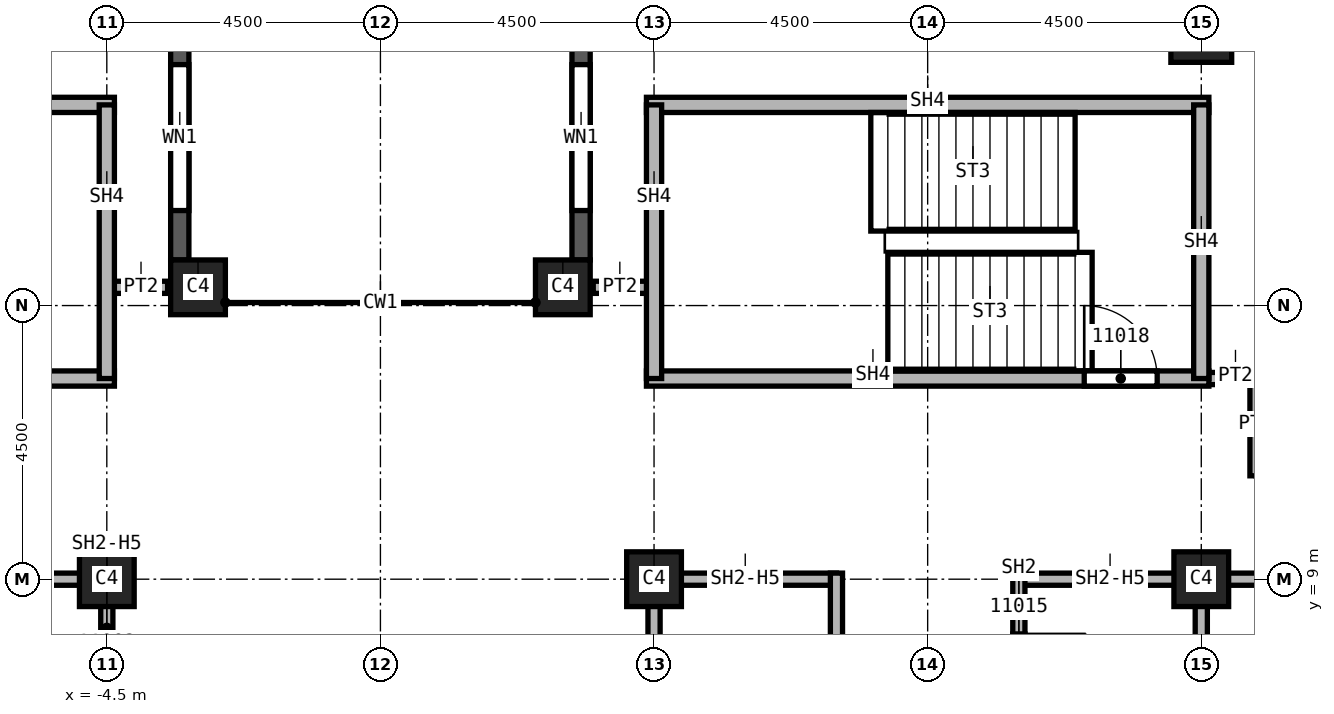
"""IFC4 building model, lengths in metres.
Left out: names, types, materials, properties, quantities, classifications, styles, units other than length and angle.
Written with IfcOpenShell. Run it as: python <this file> out.ifc"""

import sys

from ifc_helpers import new_model, si_unit, direction, frame, frame_2d, origin, origin_2d, place, context, subcontext, project, spatial, rectangle, extrude, element, fill, save


model = new_model("IFC4")
c1 = context("Model", 3, precision=1e-05, world=origin(), true_north=direction((0.0, 1.0)))
c2 = subcontext(c1, "Body", "Model", "MODEL_VIEW")
j1 = project(units=[si_unit("LENGTHUNIT", "METRE"), si_unit("PLANEANGLEUNIT", "RADIAN")], contexts=[c1])
p1 = place(None, origin())
s1 = spatial("IfcSite", under=j1, at=p1, CompositionType="ELEMENT")
p2 = place(p1, origin())
s2 = spatial("IfcBuilding", under=s1, at=p2, CompositionType="ELEMENT")
p3 = place(p2, frame((0.0, 0.0, 188.0)))
s3 = spatial("IfcBuildingStorey", under=s2, at=p3, CompositionType="ELEMENT", Elevation=188.0)
p4 = place(p3, frame((13.5, 18.0, 0.0), z_axis=(0.0, 0.0, 1.0), x_axis=(1.0, 0.0, 0.0)))
e1 = element("IfcColumn", 1, at=p4, inside=s3, PredefinedType="COLUMN", context=c2, shape_type="SweptSolid", body=[
    extrude(rectangle(XDim=1.0, YDim=1.0, at=origin_2d()), origin(), (0.0, 0.0, 1.0), 3.72),
])
for number, where, z_axis, x_axis in (
    (2, (4.5, 9.0, 0.0), (0.0, 0.0, 1.0), (1.0, 0.0, 0.0)),
    (3, (13.5, 9.0, 0.0), (0.0, 0.0, 1.0), (1.0, 0.0, 0.0)),
    (4, (-4.5, 9.0, 0.0), (0.0, 0.0, 1.0), (1.0, 0.0, 0.0)),
    (5, (3.0, 13.8, 0.0), (0.0, 0.0, 1.0), (1.0, 0.0, 0.0)),
    (6, (-3.0, 13.8, 0.0), (0.0, 0.0, 1.0), (1.0, 0.0, 0.0)),
):
    element("IfcColumn", number, at=place(p3, frame(where, z_axis=z_axis, x_axis=x_axis)), inside=s3, PredefinedType="COLUMN", context=c2, shape_type="SweptSolid", body=[
        extrude(rectangle(XDim=0.9, YDim=0.9, at=origin_2d()), origin(), (0.0, 0.0, 1.0), 3.72),
    ])
p5 = place(p3, frame((3.3, 22.3, 0.0), z_axis=(0.0, 0.0, 1.0), x_axis=(0.0, -1.0, 0.0)))
e7 = element("IfcWall", 7, at=p5, inside=s3, PredefinedType="SOLIDWALL", context=c2, shape_type="SweptSolid", body=[
    extrude(rectangle(XDim=8.05, YDim=0.3, at=frame_2d((4.025, 0.0))), origin(), (0.0, 0.0, 1.0), 3.12),
])
p6 = place(p5, frame((0.812, 0.0, 0.8)))
e8 = element("IfcOpeningElement", 8, at=p6, cuts=e7, PredefinedType="OPENING", context=c2, shape_type="SweptSolid", body=[
    extrude(rectangle(XDim=2.4, YDim=1.95, at=frame_2d((1.2, 0.975))), frame((0.0, 0.15, 0.0), z_axis=(0.0, -1.0, 0.0), x_axis=(1.0, 0.0, 0.0)), (0.0, 0.0, 1.0), 0.3),
])
p7 = place(p5, frame((4.837, 0.0, 0.8)))
e9 = element("IfcOpeningElement", 9, at=p7, cuts=e7, PredefinedType="OPENING", context=c2, shape_type="SweptSolid", body=[
    extrude(rectangle(XDim=2.4, YDim=1.95, at=frame_2d((1.2, 0.975))), frame((0.0, 0.15, 0.0), z_axis=(0.0, -1.0, 0.0), x_axis=(1.0, 0.0, 0.0)), (0.0, 0.0, 1.0), 0.3),
])
p8 = place(p3, frame((-3.3, 14.25, 0.0), z_axis=(0.0, 0.0, 1.0), x_axis=(0.0, 1.0, 0.0)))
e10 = element("IfcWall", 10, at=p8, inside=s3, PredefinedType="SOLIDWALL", context=c2, shape_type="SweptSolid", body=[
    extrude(rectangle(XDim=8.05, YDim=0.3, at=frame_2d((4.025, 0.0))), origin(), (0.0, 0.0, 1.0), 3.12),
])
p9 = place(p8, frame((0.812, 0.0, 0.8)))
e11 = element("IfcOpeningElement", 11, at=p9, cuts=e10, PredefinedType="OPENING", context=c2, shape_type="SweptSolid", body=[
    extrude(rectangle(XDim=2.4, YDim=1.95, at=frame_2d((1.2, 0.975))), frame((0.0, 0.15, 0.0), z_axis=(0.0, -1.0, 0.0), x_axis=(1.0, 0.0, 0.0)), (0.0, 0.0, 1.0), 0.3),
])
p10 = place(p8, frame((4.837, 0.0, 0.8)))
e12 = element("IfcOpeningElement", 12, at=p10, cuts=e10, PredefinedType="OPENING", context=c2, shape_type="SweptSolid", body=[
    extrude(rectangle(XDim=2.4, YDim=1.95, at=frame_2d((1.2, 0.975))), frame((0.0, 0.15, 0.0), z_axis=(0.0, -1.0, 0.0), x_axis=(1.0, 0.0, 0.0)), (0.0, 0.0, 1.0), 0.3),
])
for number, where, z_axis, x_axis in (
    (13, (-4.5, 13.8, 0.0), (0.0, 0.0, 1.0), (1.0, 0.0, 0.0)),
    (14, (3.5, 13.8, 0.0), (0.0, 0.0, 1.0), (1.0, 0.0, 0.0)),
):
    element("IfcWall", number, at=place(p3, frame(where, z_axis=z_axis, x_axis=x_axis)), inside=s3, PredefinedType="PARTITIONING", context=c2, shape_type="SweptSolid", body=[
        extrude(rectangle(XDim=1.0, YDim=0.2, at=frame_2d((0.5, 0.0))), origin(), (0.0, 0.0, 1.0), 3.72),
    ])
p11 = place(p3, frame((13.375, 12.3, 0.0), z_axis=(0.0, 0.0, 1.0), x_axis=(1.0, 0.0, 0.0)))
e15 = element("IfcWall", 15, at=p11, inside=s3, PredefinedType="PARTITIONING", context=c2, shape_type="SweptSolid", body=[
    extrude(rectangle(XDim=1.125, YDim=0.2, at=frame_2d((0.562, 0.0))), origin(), (0.0, 0.0, 1.0), 3.72),
])
p12 = place(p3, frame((18.0, 9.0, 0.0), z_axis=(0.0, 0.0, 1.0), x_axis=(-1.0, 0.0, 0.0)))
e16 = element("IfcWall", 16, at=p12, inside=s3, PredefinedType="PARTITIONING", context=c2, shape_type="SweptSolid", body=[
    extrude(rectangle(XDim=4.5, YDim=0.2, at=frame_2d((2.25, 0.0))), origin(), (0.0, 0.0, 1.0), 3.72),
])
p13 = place(p3, frame((14.4, 12.3, 0.0), z_axis=(0.0, 0.0, 1.0), x_axis=(0.0, -1.0, 0.0)))
e17 = element("IfcWall", 17, at=p13, inside=s3, PredefinedType="PARTITIONING", context=c2, shape_type="SweptSolid", body=[
    extrude(rectangle(XDim=1.6, YDim=0.2, at=frame_2d((0.8, 0.0))), origin(), (0.0, 0.0, 1.0), 3.72),
])
p14 = place(p3, frame((-7.5, 9.0, 0.0), z_axis=(0.0, 0.0, 1.0), x_axis=(1.0, 0.0, 0.0)))
e18 = element("IfcWall", 18, at=p14, inside=s3, PredefinedType="SOLIDWALL", context=c2, shape_type="SweptSolid", body=[
    extrude(rectangle(XDim=3.0, YDim=0.2, at=frame_2d((1.5, 0.0))), origin(), (0.0, 0.0, 1.0), 2.958),
])
p15 = place(p3, frame((-4.5, 9.1, 0.0), z_axis=(0.0, 0.0, 1.0), x_axis=(0.0, -1.0, 0.0)))
e19 = element("IfcWall", 19, at=p15, inside=s3, PredefinedType="SOLIDWALL", context=c2, shape_type="SweptSolid", body=[
    extrude(rectangle(XDim=3.1, YDim=0.2, at=frame_2d((1.55, 0.0))), origin(), (0.0, 0.0, 1.0), 2.958),
])
p16 = place(p15, frame((1.6, 0.0, 0.0)))
e20 = element("IfcOpeningElement", 20, at=p16, cuts=e19, PredefinedType="OPENING", context=c2, shape_type="SweptSolid", body=[
    extrude(rectangle(XDim=1.1, YDim=2.1, at=frame_2d((0.55, 1.05))), frame((0.0, 0.1, 0.0), z_axis=(0.0, -1.0, 0.0), x_axis=(1.0, 0.0, 0.0)), (0.0, 0.0, 1.0), 0.2),
])
p17 = place(p3, frame((4.5, 0.0, 0.0), z_axis=(0.0, 0.0, 1.0), x_axis=(0.0, 1.0, 0.0)))
e21 = element("IfcWall", 21, at=p17, inside=s3, PredefinedType="SOLIDWALL", context=c2, shape_type="SweptSolid", body=[
    extrude(rectangle(XDim=9.1, YDim=0.2, at=frame_2d((4.55, 0.0))), origin(), (0.0, 0.0, 1.0), 2.958),
])
p18 = place(p17, frame((5.8, 0.0, 0.0)))
e22 = element("IfcOpeningElement", 22, at=p18, cuts=e21, PredefinedType="OPENING", context=c2, shape_type="SweptSolid", body=[
    extrude(rectangle(XDim=1.1, YDim=2.1, at=frame_2d((0.55, 1.05))), frame((0.0, 0.1, 0.0), z_axis=(0.0, -1.0, 0.0), x_axis=(1.0, 0.0, 0.0)), (0.0, 0.0, 1.0), 0.2),
])
p19 = place(p3, frame((4.5, 9.0, 0.0), z_axis=(0.0, 0.0, 1.0), x_axis=(1.0, 0.0, 0.0)))
e23 = element("IfcWall", 23, at=p19, inside=s3, PredefinedType="SOLIDWALL", context=c2, shape_type="SweptSolid", body=[
    extrude(rectangle(XDim=3.0, YDim=0.2, at=frame_2d((1.5, 0.0))), origin(), (0.0, 0.0, 1.0), 2.958),
])
p20 = place(p3, frame((7.5, 9.1, 0.0), z_axis=(0.0, 0.0, 1.0), x_axis=(0.0, -1.0, 0.0)))
e24 = element("IfcWall", 24, at=p20, inside=s3, PredefinedType="SOLIDWALL", context=c2, shape_type="SweptSolid", body=[
    extrude(rectangle(XDim=6.225, YDim=0.2, at=frame_2d((3.113, 0.0))), origin(), (0.0, 0.0, 1.0), 3.72),
])
p21 = place(p3, frame((10.5, 9.0, 0.0), z_axis=(0.0, 0.0, 1.0), x_axis=(1.0, 0.0, 0.0)))
e25 = element("IfcWall", 25, at=p21, inside=s3, PredefinedType="SOLIDWALL", context=c2, shape_type="SweptSolid", body=[
    extrude(rectangle(XDim=3.1, YDim=0.2, at=frame_2d((1.55, 0.0))), origin(), (0.0, 0.0, 1.0), 2.958),
])
p22 = place(p3, frame((10.5, 9.1, 0.0), z_axis=(0.0, 0.0, 1.0), x_axis=(0.0, -1.0, 0.0)))
e26 = element("IfcWall", 26, at=p22, inside=s3, PredefinedType="SOLIDWALL", context=c2, shape_type="SweptSolid", body=[
    extrude(rectangle(XDim=3.225, YDim=0.2, at=frame_2d((1.613, 0.0))), origin(), (0.0, 0.0, 1.0), 3.72),
])
p23 = place(p22, frame((1.0, 0.0, 0.0)))
e27 = element("IfcOpeningElement", 27, at=p23, cuts=e26, PredefinedType="OPENING", context=c2, shape_type="SweptSolid", body=[
    extrude(rectangle(XDim=1.1, YDim=2.1, at=frame_2d((0.55, 1.05))), frame((0.0, 0.1, 0.0), z_axis=(0.0, -1.0, 0.0), x_axis=(1.0, 0.0, 0.0)), (0.0, 0.0, 1.0), 0.2),
])
p24 = place(p3, frame((13.5, 9.1, 0.0), z_axis=(0.0, 0.0, 1.0), x_axis=(0.0, -1.0, 0.0)))
e28 = element("IfcWall", 28, at=p24, inside=s3, PredefinedType="SOLIDWALL", context=c2, shape_type="SweptSolid", body=[
    extrude(rectangle(XDim=3.1, YDim=0.2, at=frame_2d((1.55, 0.0))), origin(), (0.0, 0.0, 1.0), 2.958),
])
p25 = place(p3, frame((-13.625, 12.3, 0.0), z_axis=(0.0, 0.0, 1.0), x_axis=(1.0, 0.0, 0.0)))
e29 = element("IfcWall", 29, at=p25, inside=s3, PredefinedType="SOLIDWALL", context=c2, shape_type="SweptSolid", body=[
    extrude(rectangle(XDim=9.25, YDim=0.25, at=frame_2d((4.625, 0.0))), origin(), (0.0, 0.0, 1.0), 3.72),
])
p26 = place(p25, frame((0.85, 0.0, 0.0)))
e30 = element("IfcOpeningElement", 30, at=p26, cuts=e29, PredefinedType="OPENING", context=c2, shape_type="SweptSolid", body=[
    extrude(rectangle(XDim=1.2, YDim=2.1, at=frame_2d((0.6, 1.05))), frame((0.0, 0.125, 0.0), z_axis=(0.0, -1.0, 0.0), x_axis=(1.0, 0.0, 0.0)), (0.0, 0.0, 1.0), 0.25),
])
p27 = place(p3, frame((-13.625, 16.8, 0.0), z_axis=(0.0, 0.0, 1.0), x_axis=(1.0, 0.0, 0.0)))
e31 = element("IfcWall", 31, at=p27, inside=s3, PredefinedType="SOLIDWALL", context=c2, shape_type="SweptSolid", body=[
    extrude(rectangle(XDim=9.25, YDim=0.25, at=frame_2d((4.625, 0.0))), origin(), (0.0, 0.0, 1.0), 3.72),
])
p28 = place(p3, frame((-4.5, 16.8, 0.0), z_axis=(0.0, 0.0, 1.0), x_axis=(0.0, -1.0, 0.0)))
e32 = element("IfcWall", 32, at=p28, inside=s3, PredefinedType="SOLIDWALL", context=c2, shape_type="SweptSolid", body=[
    extrude(rectangle(XDim=4.5, YDim=0.25, at=frame_2d((2.25, 0.0))), origin(), (0.0, 0.0, 1.0), 3.72),
])
p29 = place(p3, frame((4.375, 12.3, 0.0), z_axis=(0.0, 0.0, 1.0), x_axis=(1.0, 0.0, 0.0)))
e33 = element("IfcWall", 33, at=p29, inside=s3, PredefinedType="SOLIDWALL", context=c2, shape_type="SweptSolid", body=[
    extrude(rectangle(XDim=9.25, YDim=0.25, at=frame_2d((4.625, 0.0))), origin(), (0.0, 0.0, 1.0), 3.72),
])
p30 = place(p29, frame((7.2, 0.0, 0.0)))
e34 = element("IfcOpeningElement", 34, at=p30, cuts=e33, PredefinedType="OPENING", context=c2, shape_type="SweptSolid", body=[
    extrude(rectangle(XDim=1.2, YDim=2.1, at=frame_2d((0.6, 1.05))), frame((0.0, 0.125, 0.0), z_axis=(0.0, -1.0, 0.0), x_axis=(1.0, 0.0, 0.0)), (0.0, 0.0, 1.0), 0.25),
])
p31 = place(p3, frame((4.375, 16.8, 0.0), z_axis=(0.0, 0.0, 1.0), x_axis=(1.0, 0.0, 0.0)))
e35 = element("IfcWall", 35, at=p31, inside=s3, PredefinedType="SOLIDWALL", context=c2, shape_type="SweptSolid", body=[
    extrude(rectangle(XDim=9.25, YDim=0.25, at=frame_2d((4.625, 0.0))), origin(), (0.0, 0.0, 1.0), 3.72),
])
for number, where, z_axis, x_axis in (
    (36, (4.5, 12.3, 0.0), (0.0, 0.0, 1.0), (0.0, 1.0, 0.0)),
    (37, (13.5, 16.8, 0.0), (0.0, 0.0, 1.0), (0.0, -1.0, 0.0)),
):
    element("IfcWall", number, at=place(p3, frame(where, z_axis=z_axis, x_axis=x_axis)), inside=s3, PredefinedType="SOLIDWALL", context=c2, shape_type="SweptSolid", body=[
        extrude(rectangle(XDim=4.5, YDim=0.25, at=frame_2d((2.25, 0.0))), origin(), (0.0, 0.0, 1.0), 3.72),
    ])
p32 = place(p7, origin())
e38 = element("IfcWindow", 38, at=p32, inside=s3, PartitioningType="SINGLE_PANEL", PredefinedType="WINDOW", context=c2, shape_type="SweptSolid", body=[
    extrude(rectangle(XDim=2.4, YDim=1.95, at=frame_2d((1.2, 0.975))), frame((0.0, 0.03, 0.0), z_axis=(0.0, -1.0, 0.0), x_axis=(1.0, 0.0, 0.0)), (0.0, 0.0, 1.0), 0.06),
])
fill(e9, e38)
p33 = place(p9, origin())
e39 = element("IfcWindow", 39, at=p33, inside=s3, PartitioningType="SINGLE_PANEL", PredefinedType="WINDOW", context=c2, shape_type="SweptSolid", body=[
    extrude(rectangle(XDim=2.4, YDim=1.95, at=frame_2d((1.2, 0.975))), frame((0.0, 0.03, 0.0), z_axis=(0.0, -1.0, 0.0), x_axis=(1.0, 0.0, 0.0)), (0.0, 0.0, 1.0), 0.06),
])
fill(e11, e39)
p34 = place(p30, origin())
e40 = element("IfcDoor", 40, at=p34, inside=s3, OperationType="SINGLE_SWING_LEFT", PredefinedType="DOOR", context=c2, shape_type="SweptSolid", body=[
    extrude(rectangle(XDim=1.2, YDim=2.1, at=frame_2d((0.6, 1.05))), frame((0.0, 0.025, 0.0), z_axis=(0.0, -1.0, 0.0), x_axis=(1.0, 0.0, 0.0)), (0.0, 0.0, 1.0), 0.05),
])
fill(e34, e40)
save(model, sys.argv[1])
